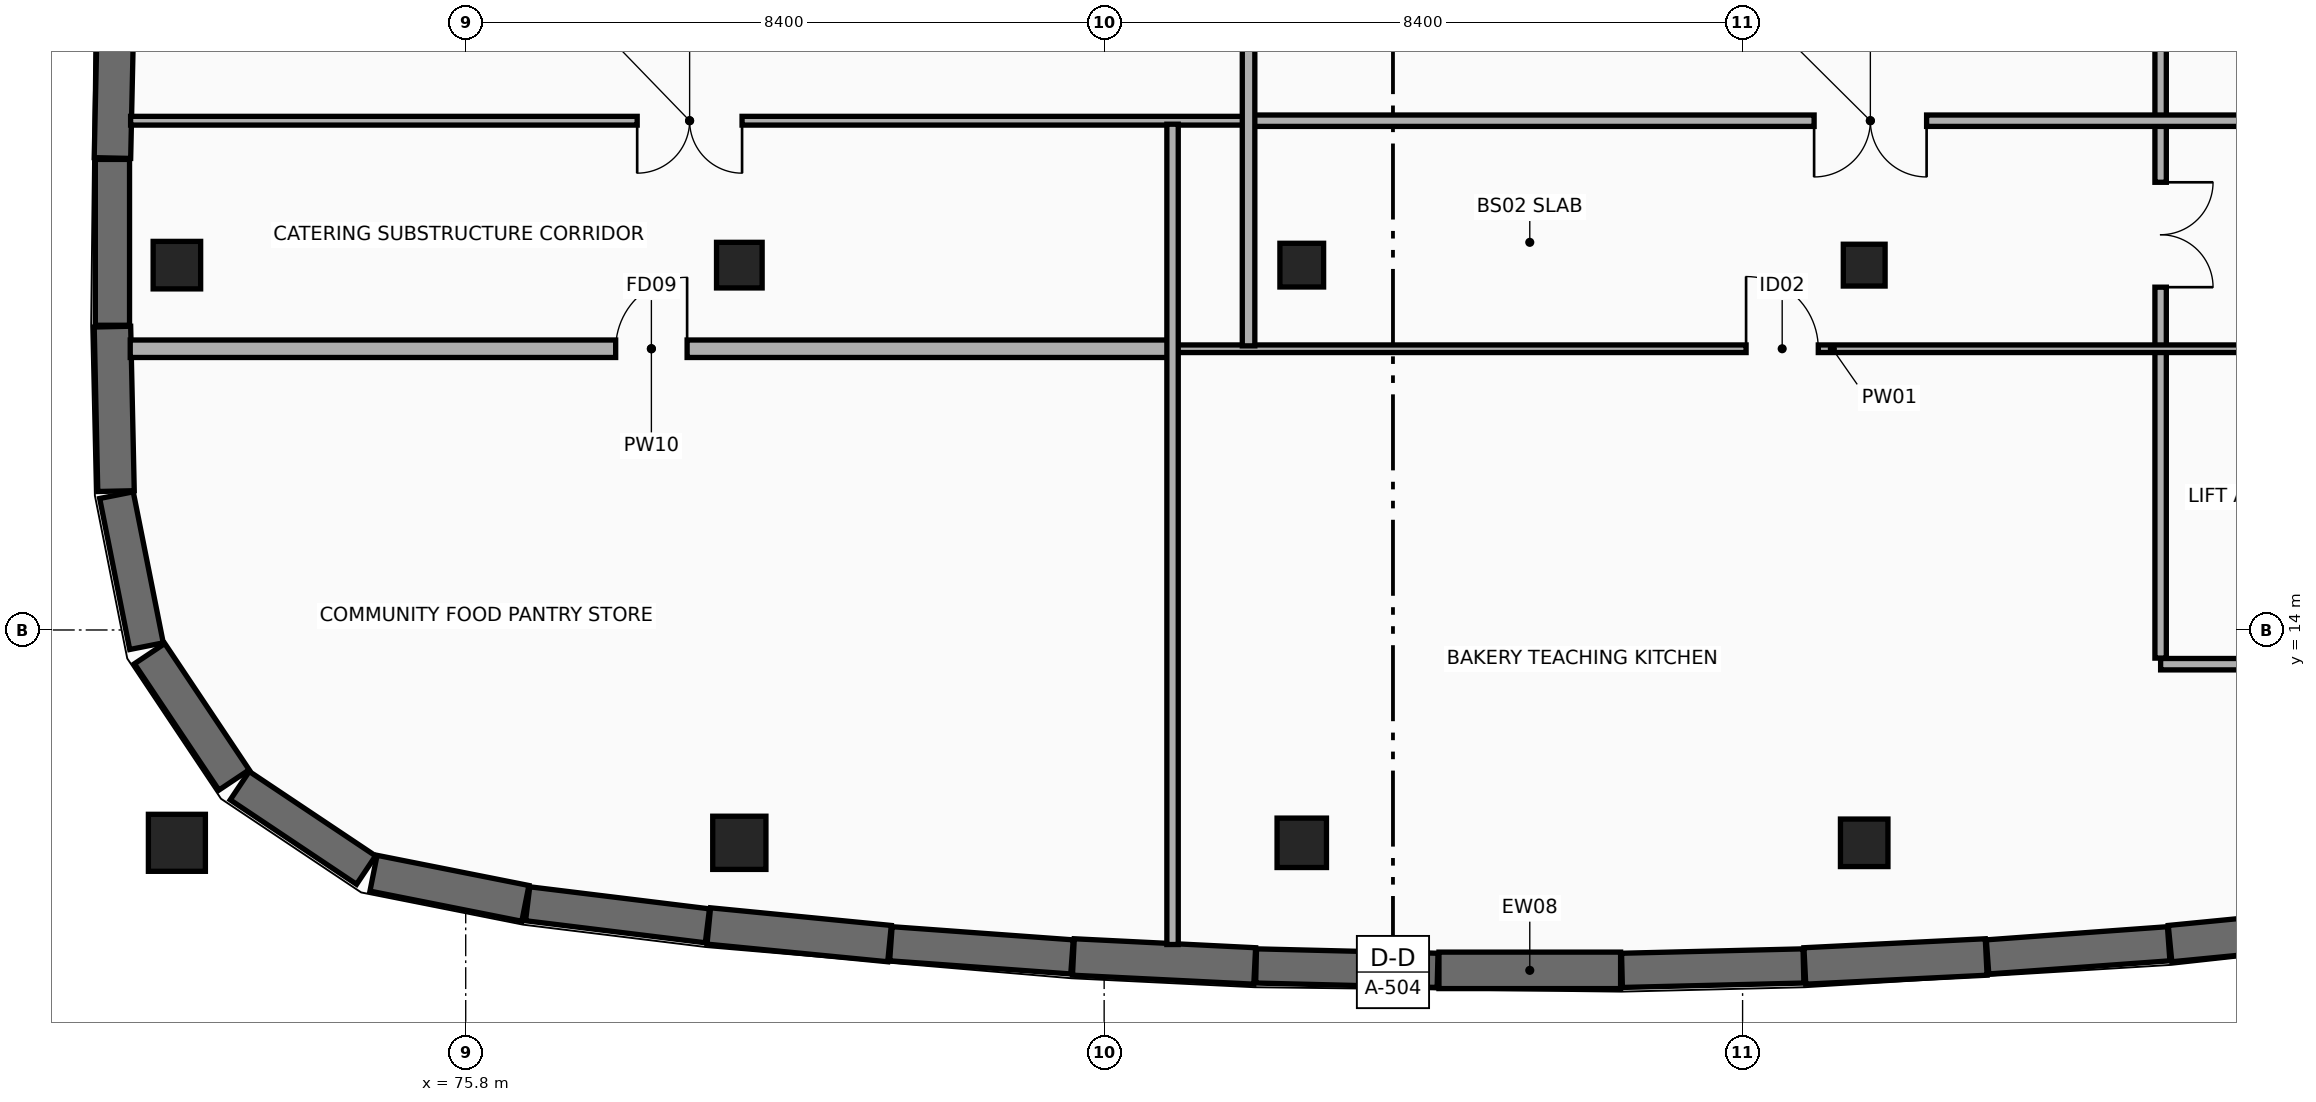
"""IFC4 building model, lengths in metres.
Left out: names, types, materials, properties, quantities, classifications, styles, units other than length and angle.
Written with IfcOpenShell. Run it as: python <this file> out.ifc"""

import sys

from ifc_helpers import new_model, si_unit, direction, frame, frame_2d, origin, origin_2d, place, context, subcontext, project, spatial, rectangle, extrude, element, fill, save


model = new_model("IFC4")
c1 = context("Model", 3, precision=1e-05, world=origin(), true_north=direction((0.0, 1.0)))
c2 = subcontext(c1, "Body", "Model", "MODEL_VIEW")
j1 = project(units=[si_unit("LENGTHUNIT", "METRE"), si_unit("PLANEANGLEUNIT", "RADIAN")], contexts=[c1])
p1 = place(None, origin())
s1 = spatial("IfcSite", under=j1, at=p1, CompositionType="ELEMENT")
p2 = place(p1, origin())
s2 = spatial("IfcBuilding", under=s1, at=p2, CompositionType="ELEMENT")
p3 = place(p2, frame((0.0, 0.0, -4.2)))
s3 = spatial("IfcBuildingStorey", under=s2, at=p3, CompositionType="ELEMENT", Elevation=-4.2)
p4 = place(p3, frame((72.0, 11.2, -0.415), z_axis=(0.0, 0.0, 1.0), x_axis=(1.0, 0.0, 0.0)))
e1 = element("IfcColumn", 1, at=p4, inside=s3, PredefinedType="COLUMN", context=c2, shape_type="SweptSolid", body=[
    extrude(rectangle(XDim=0.75, YDim=0.75, at=origin_2d()), origin(), (0.0, 0.0, 1.0), 4.615),
])
p5 = place(p3, frame((72.0, 18.8, -0.415), z_axis=(0.0, 0.0, 1.0), x_axis=(1.0, 0.0, 0.0)))
e2 = element("IfcColumn", 2, at=p5, inside=s3, PredefinedType="COLUMN", context=c2, shape_type="SweptSolid", body=[
    extrude(rectangle(XDim=0.625, YDim=0.625, at=origin_2d()), origin(), (0.0, 0.0, 1.0), 4.615),
])
p6 = place(p3, frame((79.4, 11.2, -0.415), z_axis=(0.0, 0.0, 1.0), x_axis=(1.0, 0.0, 0.0)))
e3 = element("IfcColumn", 3, at=p6, inside=s3, PredefinedType="COLUMN", context=c2, shape_type="SweptSolid", body=[
    extrude(rectangle(XDim=0.7, YDim=0.7, at=origin_2d()), origin(), (0.0, 0.0, 1.0), 4.615),
])
p7 = place(p3, frame((79.4, 18.8, -0.415), z_axis=(0.0, 0.0, 1.0), x_axis=(1.0, 0.0, 0.0)))
e4 = element("IfcColumn", 4, at=p7, inside=s3, PredefinedType="COLUMN", context=c2, shape_type="SweptSolid", body=[
    extrude(rectangle(XDim=0.6, YDim=0.6, at=origin_2d()), origin(), (0.0, 0.0, 1.0), 4.615),
])
p8 = place(p3, frame((86.8, 11.2, -0.415), z_axis=(0.0, 0.0, 1.0), x_axis=(1.0, 0.0, 0.0)))
e5 = element("IfcColumn", 5, at=p8, inside=s3, PredefinedType="COLUMN", context=c2, shape_type="SweptSolid", body=[
    extrude(rectangle(XDim=0.65, YDim=0.65, at=origin_2d()), origin(), (0.0, 0.0, 1.0), 4.615),
])
p9 = place(p3, frame((86.8, 18.8, -0.415), z_axis=(0.0, 0.0, 1.0), x_axis=(1.0, 0.0, 0.0)))
e6 = element("IfcColumn", 6, at=p9, inside=s3, PredefinedType="COLUMN", context=c2, shape_type="SweptSolid", body=[
    extrude(rectangle(XDim=0.575, YDim=0.575, at=origin_2d()), origin(), (0.0, 0.0, 1.0), 4.615),
])
p10 = place(p3, frame((94.2, 11.2, -0.415), z_axis=(0.0, 0.0, 1.0), x_axis=(1.0, 0.0, 0.0)))
e7 = element("IfcColumn", 7, at=p10, inside=s3, PredefinedType="COLUMN", context=c2, shape_type="SweptSolid", body=[
    extrude(rectangle(XDim=0.625, YDim=0.625, at=origin_2d()), origin(), (0.0, 0.0, 1.0), 4.615),
])
p11 = place(p3, frame((94.2, 18.8, -0.415), z_axis=(0.0, 0.0, 1.0), x_axis=(1.0, 0.0, 0.0)))
e8 = element("IfcColumn", 8, at=p11, inside=s3, PredefinedType="COLUMN", context=c2, shape_type="SweptSolid", body=[
    extrude(rectangle(XDim=0.55, YDim=0.55, at=origin_2d()), origin(), (0.0, 0.0, 1.0), 4.615),
])
p12 = place(p3, frame((78.98, 10.108, 0.0), z_axis=(0.0, 0.0, 1.0), x_axis=(-0.99256366712, 0.121726606435, 0.0)))
e9 = element("IfcWall", 9, at=p12, inside=s3, PredefinedType="STANDARD", context=c2, shape_type="SweptSolid", body=[
    extrude(rectangle(XDim=2.383, YDim=0.45, at=frame_2d((1.191, 0.0))), origin(), (0.0, 0.0, 1.0), 3.897),
])
p13 = place(p3, frame((81.376, 9.874, 0.0), z_axis=(0.0, 0.0, 1.0), x_axis=(-0.995277042211, 0.097075276191, 0.0)))
e10 = element("IfcWall", 10, at=p13, inside=s3, PredefinedType="STANDARD", context=c2, shape_type="SweptSolid", body=[
    extrude(rectangle(XDim=2.389, YDim=0.48, at=frame_2d((1.195, 0.0))), origin(), (0.0, 0.0, 1.0), 3.897),
])
p14 = place(p3, frame((83.777, 9.699, 0.0), z_axis=(0.0, 0.0, 1.0), x_axis=(-0.997372398559, 0.07244514195, 0.0)))
e11 = element("IfcWall", 11, at=p14, inside=s3, PredefinedType="STANDARD", context=c2, shape_type="SweptSolid", body=[
    extrude(rectangle(XDim=2.389, YDim=0.45, at=frame_2d((1.195, 0.0))), origin(), (0.0, 0.0, 1.0), 3.897),
])
p15 = place(p3, frame((86.181, 9.58, 0.0), z_axis=(0.0, 0.0, 1.0), x_axis=(-0.99878097173, 0.049361629934, 0.0)))
e12 = element("IfcWall", 12, at=p15, inside=s3, PredefinedType="STANDARD", context=c2, shape_type="SweptSolid", body=[
    extrude(rectangle(XDim=2.389, YDim=0.48, at=frame_2d((1.194, 0.0))), origin(), (0.0, 0.0, 1.0), 3.897),
])
p16 = place(p3, frame((88.587, 9.522, 0.0), z_axis=(0.0, 0.0, 1.0), x_axis=(-0.999704086624, 0.02432568987, 0.0)))
e13 = element("IfcWall", 13, at=p16, inside=s3, PredefinedType="STANDARD", context=c2, shape_type="SweptSolid", body=[
    extrude(rectangle(XDim=2.389, YDim=0.45, at=frame_2d((1.194, 0.0))), origin(), (0.0, 0.0, 1.0), 3.897),
])
p17 = place(p3, frame((90.995, 9.522, 0.0), z_axis=(0.0, 0.0, 1.0), x_axis=(-1.0, 0.0, 0.0)))
e14 = element("IfcWall", 14, at=p17, inside=s3, PredefinedType="STANDARD", context=c2, shape_type="SweptSolid", body=[
    extrude(rectangle(XDim=2.39, YDim=0.48, at=frame_2d((1.195, 0.0))), origin(), (0.0, 0.0, 1.0), 3.897),
])
p18 = place(p3, frame((93.401, 9.58, 0.0), z_axis=(0.0, 0.0, 1.0), x_axis=(-0.999704086624, -0.02432568987, 0.0)))
e15 = element("IfcWall", 15, at=p18, inside=s3, PredefinedType="STANDARD", context=c2, shape_type="SweptSolid", body=[
    extrude(rectangle(XDim=2.389, YDim=0.45, at=frame_2d((1.194, 0.0))), origin(), (0.0, 0.0, 1.0), 3.897),
])
p19 = place(p3, frame((95.805, 9.698, 0.0), z_axis=(0.0, 0.0, 1.0), x_axis=(-0.99878097173, -0.049361629934, 0.0)))
e16 = element("IfcWall", 16, at=p19, inside=s3, PredefinedType="STANDARD", context=c2, shape_type="SweptSolid", body=[
    extrude(rectangle(XDim=2.389, YDim=0.48, at=frame_2d((1.194, 0.0))), origin(), (0.0, 0.0, 1.0), 3.897),
])
p20 = place(p3, frame((98.206, 9.872, 0.0), z_axis=(0.0, 0.0, 1.0), x_axis=(-0.997372398559, -0.07244514195, 0.0)))
e17 = element("IfcWall", 17, at=p20, inside=s3, PredefinedType="STANDARD", context=c2, shape_type="SweptSolid", body=[
    extrude(rectangle(XDim=2.389, YDim=0.45, at=frame_2d((1.195, 0.0))), origin(), (0.0, 0.0, 1.0), 3.897),
])
p21 = place(p3, frame((100.602, 10.106, 0.0), z_axis=(0.0, 0.0, 1.0), x_axis=(-0.995277042211, -0.097075276191, 0.0)))
e18 = element("IfcWall", 18, at=p21, inside=s3, PredefinedType="STANDARD", context=c2, shape_type="SweptSolid", body=[
    extrude(rectangle(XDim=2.389, YDim=0.48, at=frame_2d((1.195, 0.0))), origin(), (0.0, 0.0, 1.0), 3.897),
])
p22 = place(p3, frame((71.152, 20.209, 0.0), z_axis=(0.0, 0.0, 1.0), x_axis=(0.021655570194, 0.999765490642, 0.0)))
e19 = element("IfcWall", 19, at=p22, inside=s3, PredefinedType="STANDARD", context=c2, shape_type="SweptSolid", body=[
    extrude(rectangle(XDim=2.165, YDim=0.48, at=frame_2d((1.082, 0.0))), origin(), (0.0, 0.0, 1.0), 3.897),
])
p23 = place(p3, frame((71.152, 18.009, 0.0), z_axis=(0.0, 0.0, 1.0), x_axis=(0.0, 1.0, 0.0)))
e20 = element("IfcWall", 20, at=p23, inside=s3, PredefinedType="STANDARD", context=c2, shape_type="SweptSolid", body=[
    extrude(rectangle(XDim=2.182, YDim=0.45, at=frame_2d((1.091, 0.0))), origin(), (0.0, 0.0, 1.0), 3.897),
])
p24 = place(p3, frame((71.199, 15.827, 0.0), z_axis=(0.0, 0.0, 1.0), x_axis=(-0.021655570194, 0.999765490642, 0.0)))
e21 = element("IfcWall", 21, at=p24, inside=s3, PredefinedType="STANDARD", context=c2, shape_type="SweptSolid", body=[
    extrude(rectangle(XDim=2.165, YDim=0.48, at=frame_2d((1.082, 0.0))), origin(), (0.0, 0.0, 1.0), 3.897),
])
p25 = place(p3, frame((71.6, 13.787, 0.0), z_axis=(0.0, 0.0, 1.0), x_axis=(-0.195003504379, 0.980802545511, 0.0)))
e22 = element("IfcWall", 22, at=p25, inside=s3, PredefinedType="STANDARD", context=c2, shape_type="SweptSolid", body=[
    extrude(rectangle(XDim=2.026, YDim=0.45, at=frame_2d((1.013, 0.0))), origin(), (0.0, 0.0, 1.0), 3.897),
])
p26 = place(p3, frame((72.752, 12.027, 0.0), z_axis=(0.0, 0.0, 1.0), x_axis=(-0.55571444413, 0.831373235427, 0.0)))
e23 = element("IfcWall", 23, at=p26, inside=s3, PredefinedType="STANDARD", context=c2, shape_type="SweptSolid", body=[
    extrude(rectangle(XDim=1.999, YDim=0.48, at=frame_2d((1.0, 0.0))), origin(), (0.0, 0.0, 1.0), 3.897),
])
p27 = place(p3, frame((74.489, 10.841, 0.0), z_axis=(0.0, 0.0, 1.0), x_axis=(-0.831410947249, 0.555658021443, 0.0)))
e24 = element("IfcWall", 24, at=p27, inside=s3, PredefinedType="STANDARD", context=c2, shape_type="SweptSolid", body=[
    extrude(rectangle(XDim=1.999, YDim=0.45, at=frame_2d((1.0, 0.0))), origin(), (0.0, 0.0, 1.0), 3.897),
])
p28 = place(p3, frame((76.585, 10.403, 0.0), z_axis=(0.0, 0.0, 1.0), x_axis=(-0.980828799122, 0.194871410969, 0.0)))
e25 = element("IfcWall", 25, at=p28, inside=s3, PredefinedType="STANDARD", context=c2, shape_type="SweptSolid", body=[
    extrude(rectangle(XDim=2.037, YDim=0.48, at=frame_2d((1.019, 0.0))), origin(), (0.0, 0.0, 1.0), 3.897),
])
p29 = place(p3, frame((98.1, 13.55, 0.0), z_axis=(0.0, 0.0, 1.0), x_axis=(1.0, 0.0, 0.0)))
e26 = element("IfcWall", 26, at=p29, inside=s3, PredefinedType="PARTITIONING", context=c2, shape_type="SweptSolid", body=[
    extrude(rectangle(XDim=4.365, YDim=0.15, at=frame_2d((2.183, 0.0))), origin(), (0.0, 0.0, 1.0), 3.285),
])
p30 = place(p3, frame((98.1, 24.77, 0.0), z_axis=(0.0, 0.0, 1.0), x_axis=(0.0, -1.0, 0.0)))
e27 = element("IfcWall", 27, at=p30, inside=s3, PredefinedType="PARTITIONING", context=c2, shape_type="SweptSolid", body=[
    extrude(rectangle(XDim=11.14, YDim=0.15, at=frame_2d((5.57, 0.0))), origin(), (0.0, 0.0, 1.0), 3.472),
])
p31 = place(p30, frame((4.88, 0.0, 0.0)))
e28 = element("IfcOpeningElement", 28, at=p31, cuts=e27, PredefinedType="OPENING", context=c2, shape_type="SweptSolid", body=[
    extrude(rectangle(XDim=1.38, YDim=2.2, at=frame_2d((0.69, 1.1))), frame((0.0, 0.085, 0.0), z_axis=(0.0, -1.0, 0.0), x_axis=(1.0, 0.0, 0.0)), (0.0, 0.0, 1.0), 0.17),
])
p32 = place(p3, frame((71.386, 17.7, 0.0), z_axis=(0.0, 0.0, 1.0), x_axis=(1.0, 0.0, 0.0)))
e29 = element("IfcWall", 29, at=p32, inside=s3, PredefinedType="PARTITIONING", context=c2, shape_type="SweptSolid", body=[
    extrude(rectangle(XDim=13.714, YDim=0.23, at=frame_2d((6.857, 0.0))), origin(), (0.0, 0.0, 1.0), 3.36),
])
p33 = place(p32, frame((6.387, 0.0, 0.0)))
e30 = element("IfcOpeningElement", 30, at=p33, cuts=e29, PredefinedType="OPENING", context=c2, shape_type="SweptSolid", body=[
    extrude(rectangle(XDim=0.94, YDim=2.1, at=frame_2d((0.47, 1.05))), frame((0.0, 0.125, 0.0), z_axis=(0.0, -1.0, 0.0), x_axis=(1.0, 0.0, 0.0)), (0.0, 0.0, 1.0), 0.25),
])
p34 = place(p3, frame((85.1, 17.7, 0.0), z_axis=(0.0, 0.0, 1.0), x_axis=(1.0, 0.0, 0.0)))
e31 = element("IfcWall", 31, at=p34, inside=s3, PredefinedType="PARTITIONING", context=c2, shape_type="SweptSolid", body=[
    extrude(rectangle(XDim=17.362, YDim=0.1, at=frame_2d((8.681, 0.0))), origin(), (0.0, 0.0, 1.0), 3.285),
])
p35 = place(p34, frame((7.546, 0.0, 0.0)))
e32 = element("IfcOpeningElement", 32, at=p35, cuts=e31, PredefinedType="OPENING", context=c2, shape_type="SweptSolid", body=[
    extrude(rectangle(XDim=0.95, YDim=2.11, at=frame_2d((0.475, 1.055))), frame((0.0, 0.06, 0.0), z_axis=(0.0, -1.0, 0.0), x_axis=(1.0, 0.0, 0.0)), (0.0, 0.0, 1.0), 0.12),
])
p36 = place(p3, frame((86.1, 20.7, 0.0), z_axis=(0.0, 0.0, 1.0), x_axis=(-1.0, 0.0, 0.0)))
e33 = element("IfcWall", 33, at=p36, inside=s3, PredefinedType="PARTITIONING", context=c2, shape_type="SweptSolid", body=[
    extrude(rectangle(XDim=14.709, YDim=0.115, at=frame_2d((7.354, 0.0))), origin(), (0.0, 0.0, 1.0), 3.335),
])
p37 = place(p36, frame((6.664, 0.0, 0.0)))
e34 = element("IfcOpeningElement", 34, at=p37, cuts=e33, PredefinedType="OPENING", context=c2, shape_type="SweptSolid", body=[
    extrude(rectangle(XDim=1.38, YDim=2.2, at=frame_2d((0.69, 1.1))), frame((0.0, 0.067, 0.0), z_axis=(0.0, -1.0, 0.0), x_axis=(1.0, 0.0, 0.0)), (0.0, 0.0, 1.0), 0.135),
])
p38 = place(p3, frame((102.462, 20.7, 0.0), z_axis=(0.0, 0.0, 1.0), x_axis=(-1.0, 0.0, 0.0)))
e35 = element("IfcWall", 35, at=p38, inside=s3, PredefinedType="PARTITIONING", context=c2, shape_type="SweptSolid", body=[
    extrude(rectangle(XDim=16.362, YDim=0.15, at=frame_2d((8.181, 0.0))), origin(), (0.0, 0.0, 1.0), 3.235),
])
p39 = place(p38, frame((7.441, 0.0, 0.0)))
e36 = element("IfcOpeningElement", 36, at=p39, cuts=e35, PredefinedType="OPENING", context=c2, shape_type="SweptSolid", body=[
    extrude(rectangle(XDim=1.48, YDim=2.22, at=frame_2d((0.74, 1.11))), frame((0.0, 0.085, 0.0), z_axis=(0.0, -1.0, 0.0), x_axis=(1.0, 0.0, 0.0)), (0.0, 0.0, 1.0), 0.17),
])
p40 = place(p3, frame((85.1, 9.862, 0.0), z_axis=(0.0, 0.0, 1.0), x_axis=(0.0, 1.0, 0.0)))
e37 = element("IfcWall", 37, at=p40, inside=s3, PredefinedType="PARTITIONING", context=c2, shape_type="SweptSolid", body=[
    extrude(rectangle(XDim=10.792, YDim=0.15, at=frame_2d((5.396, 0.0))), origin(), (0.0, 0.0, 1.0), 3.479),
])
p41 = place(p3, frame((86.1, 17.738, 0.0), z_axis=(0.0, 0.0, 1.0), x_axis=(0.0, 1.0, 0.0)))
e38 = element("IfcWall", 38, at=p41, inside=s3, PredefinedType="PARTITIONING", context=c2, shape_type="SweptSolid", body=[
    extrude(rectangle(XDim=10.65, YDim=0.165, at=frame_2d((5.325, 0.0))), origin(), (0.0, 0.0, 1.0), 3.476),
])
p42 = place(p31, origin())
e39 = element("IfcDoor", 39, at=p42, inside=s3, OperationType="DOUBLE_DOOR_SINGLE_SWING", PredefinedType="DOOR", context=c2, shape_type="SweptSolid", body=[
    extrude(rectangle(XDim=1.38, YDim=2.2, at=frame_2d((0.69, 1.1))), frame((0.0, 0.025, 0.0), z_axis=(0.0, -1.0, 0.0), x_axis=(1.0, 0.0, 0.0)), (0.0, 0.0, 1.0), 0.05),
])
fill(e28, e39)
p43 = place(p33, origin())
e40 = element("IfcDoor", 40, at=p43, inside=s3, OperationType="SINGLE_SWING_RIGHT", PredefinedType="DOOR", context=c2, shape_type="SweptSolid", body=[
    extrude(rectangle(XDim=0.94, YDim=2.1, at=frame_2d((0.47, 1.05))), frame((0.0, 0.025, 0.0), z_axis=(0.0, -1.0, 0.0), x_axis=(1.0, 0.0, 0.0)), (0.0, 0.0, 1.0), 0.05),
])
fill(e30, e40)
p44 = place(p35, origin())
e41 = element("IfcDoor", 41, at=p44, inside=s3, OperationType="SINGLE_SWING_LEFT", PredefinedType="DOOR", context=c2, shape_type="SweptSolid", body=[
    extrude(rectangle(XDim=0.95, YDim=2.11, at=frame_2d((0.475, 1.055))), frame((0.0, 0.025, 0.0), z_axis=(0.0, -1.0, 0.0), x_axis=(1.0, 0.0, 0.0)), (0.0, 0.0, 1.0), 0.05),
])
fill(e32, e41)
p45 = place(p37, origin())
e42 = element("IfcDoor", 42, at=p45, inside=s3, OperationType="DOUBLE_DOOR_SINGLE_SWING", PredefinedType="DOOR", context=c2, shape_type="SweptSolid", body=[
    extrude(rectangle(XDim=1.38, YDim=2.2, at=frame_2d((0.69, 1.1))), frame((0.0, 0.025, 0.0), z_axis=(0.0, -1.0, 0.0), x_axis=(1.0, 0.0, 0.0)), (0.0, 0.0, 1.0), 0.05),
])
fill(e34, e42)
p46 = place(p39, origin())
e43 = element("IfcDoor", 43, at=p46, inside=s3, OperationType="DOUBLE_DOOR_SINGLE_SWING", PredefinedType="DOOR", context=c2, shape_type="SweptSolid", body=[
    extrude(rectangle(XDim=1.48, YDim=2.22, at=frame_2d((0.74, 1.11))), frame((0.0, 0.025, 0.0), z_axis=(0.0, -1.0, 0.0), x_axis=(1.0, 0.0, 0.0)), (0.0, 0.0, 1.0), 0.05),
])
fill(e36, e43)
save(model, sys.argv[1])
